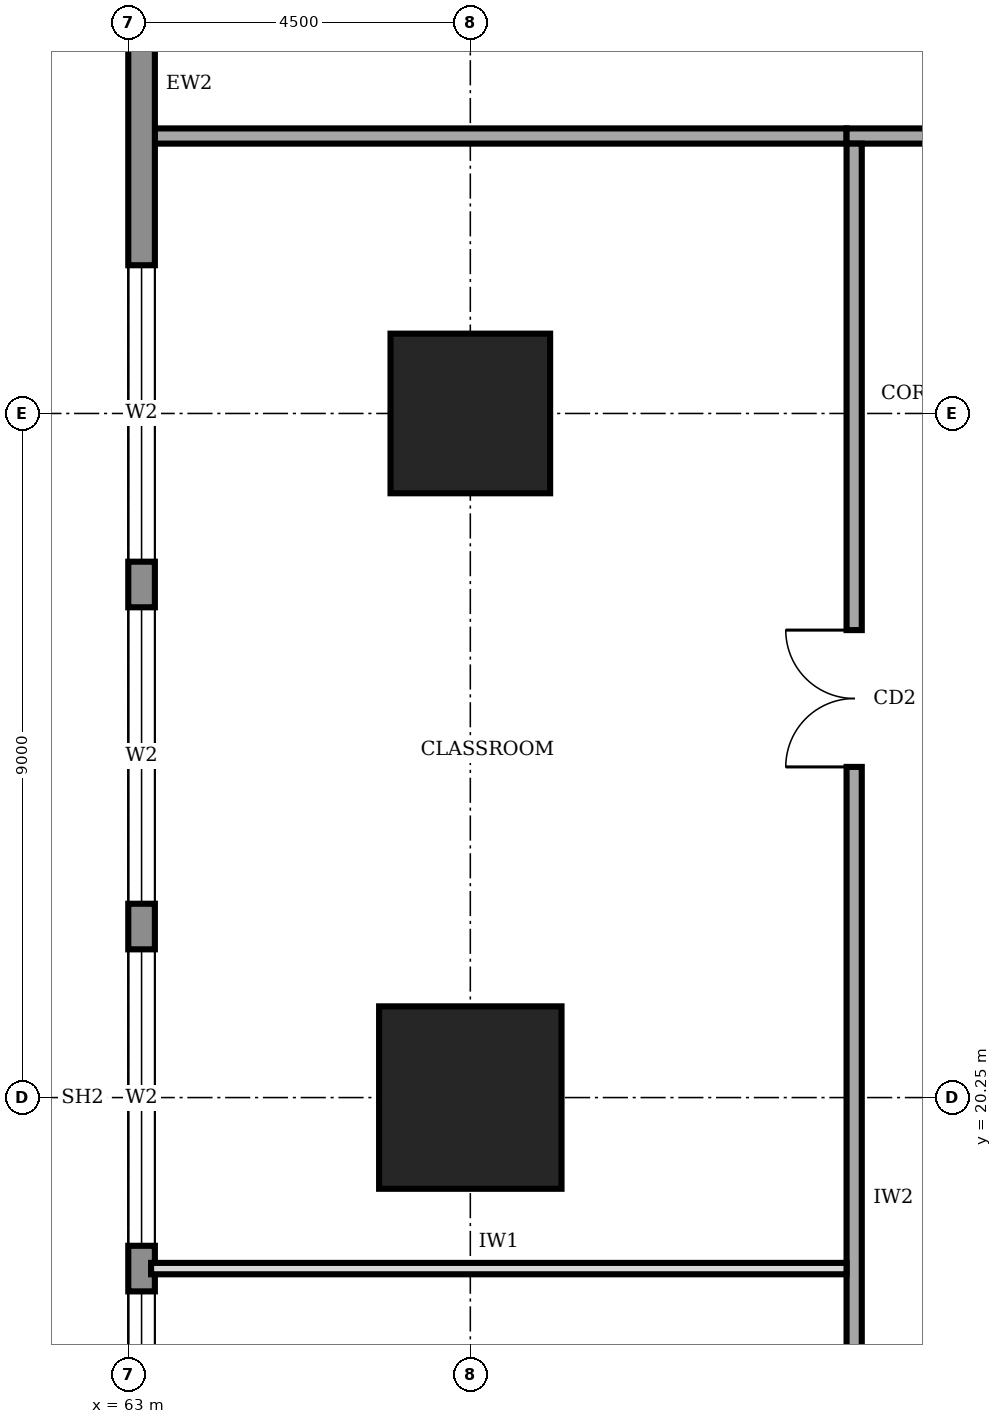
"""IFC4 building model, lengths in metres.
Left out: names, types, materials, properties, quantities, classifications, styles, units other than length and angle.
Written with IfcOpenShell. Run it as: python <this file> out.ifc"""

import sys

from ifc_helpers import new_model, si_unit, direction, frame, frame_2d, origin, origin_2d, place, context, subcontext, project, spatial, rectangle, extrude, element, fill, save


model = new_model("IFC4")
c1 = context("Model", 3, precision=1e-05, world=origin(), true_north=direction((0.0, 1.0)))
c2 = subcontext(c1, "Body", "Model", "MODEL_VIEW")
j1 = project(units=[si_unit("LENGTHUNIT", "METRE"), si_unit("PLANEANGLEUNIT", "RADIAN")], contexts=[c1])
p1 = place(None, origin())
s1 = spatial("IfcSite", under=j1, at=p1, CompositionType="ELEMENT")
p2 = place(p1, origin())
s2 = spatial("IfcBuilding", under=s1, at=p2, CompositionType="ELEMENT")
p3 = place(p2, frame((0.0, 0.0, 69.0)))
s3 = spatial("IfcBuildingStorey", under=s2, at=p3, CompositionType="ELEMENT", Elevation=69.0)
p4 = place(p3, frame((67.5, 20.25, 0.0), z_axis=(0.0, 0.0, 1.0), x_axis=(1.0, 0.0, 0.0)))
e1 = element("IfcColumn", 1, at=p4, inside=s3, PredefinedType="COLUMN", context=c2, shape_type="SweptSolid", body=[
    extrude(rectangle(XDim=2.4, YDim=2.4, at=origin_2d()), origin(), (0.0, 0.0, 1.0), 4.0),
])
p5 = place(p3, frame((67.5, 29.25, 0.0), z_axis=(0.0, 0.0, 1.0), x_axis=(1.0, 0.0, 0.0)))
e2 = element("IfcColumn", 2, at=p5, inside=s3, PredefinedType="COLUMN", context=c2, shape_type="SweptSolid", body=[
    extrude(rectangle(XDim=2.1, YDim=2.1, at=origin_2d()), origin(), (0.0, 0.0, 1.0), 4.0),
])
p6 = place(p3, frame((63.175, 35.98, 0.0), z_axis=(0.0, 0.0, 1.0), x_axis=(0.0, -1.0, 0.0)))
e3 = element("IfcWall", 3, at=p6, inside=s3, PredefinedType="STANDARD", context=c2, shape_type="SweptSolid", body=[
    extrude(rectangle(XDim=31.46, YDim=0.35, at=frame_2d((15.73, 0.0))), origin(), (0.0, 0.0, 1.0), 3.75),
])
p7 = place(p6, frame((27.21, 0.0, 0.6)))
e4 = element("IfcOpeningElement", 4, at=p7, cuts=e3, PredefinedType="OPENING", context=c2, shape_type="SweptSolid", body=[
    extrude(rectangle(XDim=3.9, YDim=2.6, at=frame_2d((1.95, 1.3))), frame((0.0, 0.185, 0.0), z_axis=(0.0, -1.0, 0.0), x_axis=(1.0, 0.0, 0.0)), (0.0, 0.0, 1.0), 0.37),
])
p8 = place(p6, frame((22.78, 0.0, 0.6)))
e5 = element("IfcOpeningElement", 5, at=p8, cuts=e3, PredefinedType="OPENING", context=c2, shape_type="SweptSolid", body=[
    extrude(rectangle(XDim=3.9, YDim=2.6, at=frame_2d((1.95, 1.3))), frame((0.0, 0.185, 0.0), z_axis=(0.0, -1.0, 0.0), x_axis=(1.0, 0.0, 0.0)), (0.0, 0.0, 1.0), 0.37),
])
p9 = place(p6, frame((18.28, 0.0, 0.6)))
e6 = element("IfcOpeningElement", 6, at=p9, cuts=e3, PredefinedType="OPENING", context=c2, shape_type="SweptSolid", body=[
    extrude(rectangle(XDim=3.9, YDim=2.6, at=frame_2d((1.95, 1.3))), frame((0.0, 0.185, 0.0), z_axis=(0.0, -1.0, 0.0), x_axis=(1.0, 0.0, 0.0)), (0.0, 0.0, 1.0), 0.37),
])
p10 = place(p6, frame((13.78, 0.0, 0.6)))
e7 = element("IfcOpeningElement", 7, at=p10, cuts=e3, PredefinedType="OPENING", context=c2, shape_type="SweptSolid", body=[
    extrude(rectangle(XDim=3.9, YDim=2.6, at=frame_2d((1.95, 1.3))), frame((0.0, 0.185, 0.0), z_axis=(0.0, -1.0, 0.0), x_axis=(1.0, 0.0, 0.0)), (0.0, 0.0, 1.0), 0.37),
])
p11 = place(p6, frame((9.28, 0.0, 0.6)))
e8 = element("IfcOpeningElement", 8, at=p11, cuts=e3, PredefinedType="OPENING", context=c2, shape_type="SweptSolid", body=[
    extrude(rectangle(XDim=3.9, YDim=2.6, at=frame_2d((1.95, 1.3))), frame((0.0, 0.185, 0.0), z_axis=(0.0, -1.0, 0.0), x_axis=(1.0, 0.0, 0.0)), (0.0, 0.0, 1.0), 0.37),
])
p12 = place(p6, frame((4.78, 0.0, 0.6)))
e9 = element("IfcOpeningElement", 9, at=p12, cuts=e3, PredefinedType="OPENING", context=c2, shape_type="SweptSolid", body=[
    extrude(rectangle(XDim=3.9, YDim=2.6, at=frame_2d((1.95, 1.3))), frame((0.0, 0.185, 0.0), z_axis=(0.0, -1.0, 0.0), x_axis=(1.0, 0.0, 0.0)), (0.0, 0.0, 1.0), 0.37),
])
p13 = place(p3, frame((89.35, 32.9, 0.0), z_axis=(0.0, 0.0, 1.0), x_axis=(-1.0, 0.0, 0.0)))
e10 = element("IfcWall", 10, at=p13, inside=s3, PredefinedType="SOLIDWALL", context=c2, shape_type="SweptSolid", body=[
    extrude(rectangle(XDim=16.9, YDim=0.2, at=frame_2d((8.45, 0.0))), origin(), (0.0, 0.0, 1.0), 3.75),
])
p14 = place(p13, frame((14.375, 0.0, 0.0)))
e11 = element("IfcOpeningElement", 11, at=p14, cuts=e10, PredefinedType="OPENING", context=c2, shape_type="SweptSolid", body=[
    extrude(rectangle(XDim=1.0, YDim=2.1, at=frame_2d((0.5, 1.05))), frame((0.0, 0.11, 0.0), z_axis=(0.0, -1.0, 0.0), x_axis=(1.0, 0.0, 0.0)), (0.0, 0.0, 1.0), 0.22),
])
p15 = place(p13, frame((7.85, 0.0, 0.0)))
e12 = element("IfcOpeningElement", 12, at=p15, cuts=e10, PredefinedType="OPENING", context=c2, shape_type="SweptSolid", body=[
    extrude(rectangle(XDim=1.0, YDim=2.1, at=frame_2d((0.5, 1.05))), frame((0.0, 0.11, 0.0), z_axis=(0.0, -1.0, 0.0), x_axis=(1.0, 0.0, 0.0)), (0.0, 0.0, 1.0), 0.22),
])
p16 = place(p13, frame((1.325, 0.0, 0.0)))
e13 = element("IfcOpeningElement", 13, at=p16, cuts=e10, PredefinedType="OPENING", context=c2, shape_type="SweptSolid", body=[
    extrude(rectangle(XDim=1.0, YDim=2.1, at=frame_2d((0.5, 1.05))), frame((0.0, 0.11, 0.0), z_axis=(0.0, -1.0, 0.0), x_axis=(1.0, 0.0, 0.0)), (0.0, 0.0, 1.0), 0.22),
])
p17 = place(p3, frame((72.55, 32.8, 0.0), z_axis=(0.0, 0.0, 1.0), x_axis=(0.0, -1.0, 0.0)))
e14 = element("IfcWall", 14, at=p17, inside=s3, PredefinedType="SOLIDWALL", context=c2, shape_type="SweptSolid", body=[
    extrude(rectangle(XDim=25.3, YDim=0.2, at=frame_2d((12.65, 0.0))), origin(), (0.0, 0.0, 1.0), 3.75),
])
p18 = place(p17, frame((19.55, 0.0, 0.0)))
e15 = element("IfcOpeningElement", 15, at=p18, cuts=e14, PredefinedType="OPENING", context=c2, shape_type="SweptSolid", body=[
    extrude(rectangle(XDim=1.0, YDim=2.1, at=frame_2d((0.5, 1.05))), frame((0.0, 0.11, 0.0), z_axis=(0.0, -1.0, 0.0), x_axis=(1.0, 0.0, 0.0)), (0.0, 0.0, 1.0), 0.22),
])
p19 = place(p17, frame((6.4, 0.0, 0.0)))
e16 = element("IfcOpeningElement", 16, at=p19, cuts=e14, PredefinedType="OPENING", context=c2, shape_type="SweptSolid", body=[
    extrude(rectangle(XDim=1.8, YDim=2.1, at=frame_2d((0.9, 1.05))), frame((0.0, 0.11, 0.0), z_axis=(0.0, -1.0, 0.0), x_axis=(1.0, 0.0, 0.0)), (0.0, 0.0, 1.0), 0.22),
])
p20 = place(p3, frame((63.3, 32.9, 0.0), z_axis=(0.0, 0.0, 1.0), x_axis=(1.0, 0.0, 0.0)))
e17 = element("IfcWall", 17, at=p20, inside=s3, PredefinedType="SOLIDWALL", context=c2, shape_type="SweptSolid", body=[
    extrude(rectangle(XDim=9.15, YDim=0.2, at=frame_2d((4.575, 0.0))), origin(), (0.0, 0.0, 1.0), 3.75),
])
p21 = place(p3, frame((63.3, 18.0, 0.0), z_axis=(0.0, 0.0, 1.0), x_axis=(1.0, 0.0, 0.0)))
e18 = element("IfcWall", 18, at=p21, inside=s3, PredefinedType="PARTITIONING", context=c2, shape_type="SweptSolid", body=[
    extrude(rectangle(XDim=9.15, YDim=0.15, at=frame_2d((4.575, 0.0))), origin(), (0.0, 0.0, 1.0), 3.75),
])
p22 = place(p9, origin())
e19 = element("IfcWindow", 19, at=p22, inside=s3, PartitioningType="SINGLE_PANEL", PredefinedType="WINDOW", context=c2, shape_type="SweptSolid", body=[
    extrude(rectangle(XDim=3.9, YDim=2.6, at=frame_2d((1.95, 1.3))), frame((0.0, 0.03, 0.0), z_axis=(0.0, -1.0, 0.0), x_axis=(1.0, 0.0, 0.0)), (0.0, 0.0, 1.0), 0.06),
])
fill(e6, e19)
p23 = place(p10, origin())
e20 = element("IfcWindow", 20, at=p23, inside=s3, PartitioningType="SINGLE_PANEL", PredefinedType="WINDOW", context=c2, shape_type="SweptSolid", body=[
    extrude(rectangle(XDim=3.9, YDim=2.6, at=frame_2d((1.95, 1.3))), frame((0.0, 0.03, 0.0), z_axis=(0.0, -1.0, 0.0), x_axis=(1.0, 0.0, 0.0)), (0.0, 0.0, 1.0), 0.06),
])
fill(e7, e20)
p24 = place(p11, origin())
e21 = element("IfcWindow", 21, at=p24, inside=s3, PartitioningType="SINGLE_PANEL", PredefinedType="WINDOW", context=c2, shape_type="SweptSolid", body=[
    extrude(rectangle(XDim=3.9, YDim=2.6, at=frame_2d((1.95, 1.3))), frame((0.0, 0.03, 0.0), z_axis=(0.0, -1.0, 0.0), x_axis=(1.0, 0.0, 0.0)), (0.0, 0.0, 1.0), 0.06),
])
fill(e8, e21)
p25 = place(p12, origin())
e22 = element("IfcWindow", 22, at=p25, inside=s3, PartitioningType="SINGLE_PANEL", PredefinedType="WINDOW", context=c2, shape_type="SweptSolid", body=[
    extrude(rectangle(XDim=3.9, YDim=2.6, at=frame_2d((1.95, 1.3))), frame((0.0, 0.03, 0.0), z_axis=(0.0, -1.0, 0.0), x_axis=(1.0, 0.0, 0.0)), (0.0, 0.0, 1.0), 0.06),
])
fill(e9, e22)
p26 = place(p19, frame((1.8, 0.0, 0.0), z_axis=(0.0, 0.0, 1.0), x_axis=(-1.0, 0.0, 0.0)))
e23 = element("IfcDoor", 23, at=p26, inside=s3, OperationType="DOUBLE_DOOR_SINGLE_SWING", PredefinedType="DOOR", context=c2, shape_type="SweptSolid", body=[
    extrude(rectangle(XDim=1.8, YDim=2.1, at=frame_2d((0.9, 1.05))), frame((0.0, 0.025, 0.0), z_axis=(0.0, -1.0, 0.0), x_axis=(1.0, 0.0, 0.0)), (0.0, 0.0, 1.0), 0.05),
])
fill(e16, e23)
save(model, sys.argv[1])
